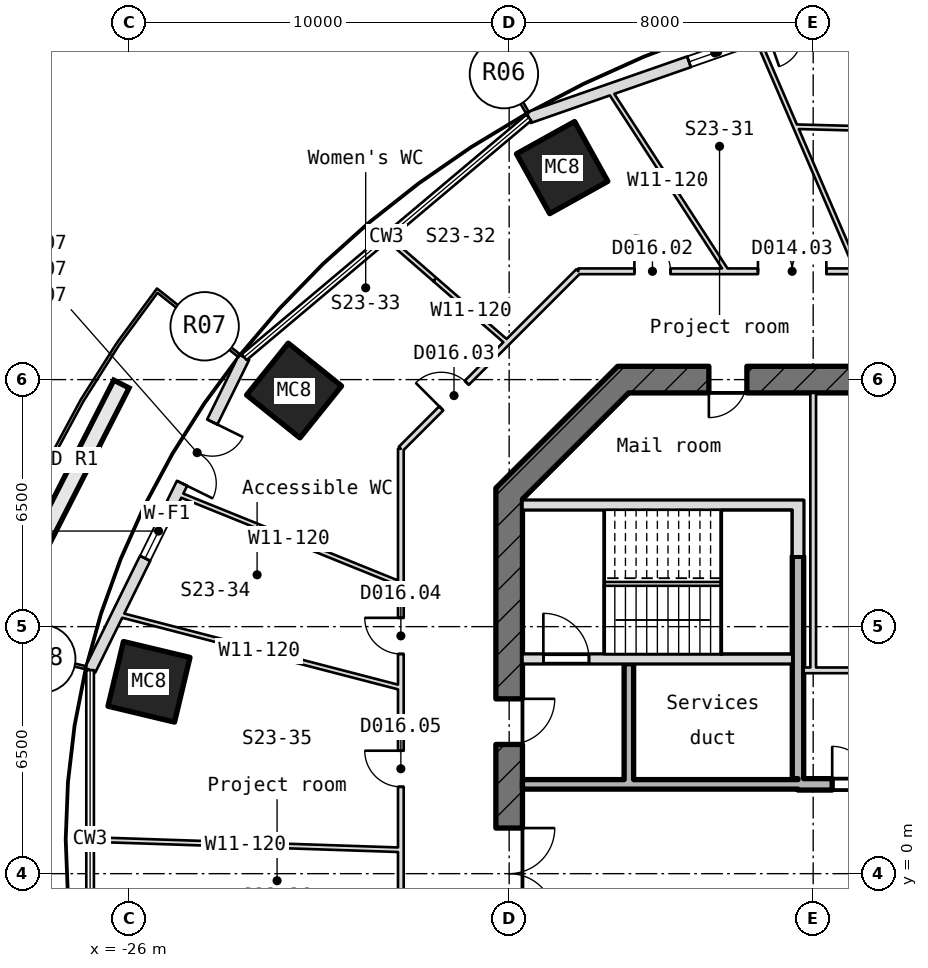
"""IFC4 building model, lengths in metres.
Left out: names, types, materials, properties, quantities, classifications, styles, units other than length and angle.
Written with IfcOpenShell. Run it as: python <this file> out.ifc"""

import sys

from ifc_helpers import new_model, si_unit, direction, frame, frame_2d, origin, origin_2d, place, context, subcontext, project, spatial, rectangle, hollow_rectangle, extrude, element, fill, save


model = new_model("IFC4")
c1 = context("Model", 3, precision=1e-05, world=origin(), true_north=direction((0.0, 1.0)))
c2 = subcontext(c1, "Body", "Model", "MODEL_VIEW")
j1 = project(units=[si_unit("LENGTHUNIT", "METRE"), si_unit("PLANEANGLEUNIT", "RADIAN")], contexts=[c1])
p1 = place(None, origin())
s1 = spatial("IfcSite", under=j1, at=p1, CompositionType="ELEMENT")
p2 = place(p1, origin())
s2 = spatial("IfcBuilding", under=s1, at=p2, CompositionType="ELEMENT")
p3 = place(p2, frame((0.0, 0.0, 334.3)))
s3 = spatial("IfcBuildingStorey", under=s2, at=p3, CompositionType="ELEMENT", Elevation=334.3)
for number, where, z_axis, x_axis in (
    (1, (-14.605, 18.579, -0.18), (0.0, 0.0, 1.0), (0.874, 0.486, 0.0)),
    (2, (-21.66, 12.712, -0.18), (0.0, 0.0, 1.0), (0.626, 0.78, 0.0)),
    (3, (-25.478, 5.048, -0.18), (0.0, 0.0, 1.0), (0.233, 0.973, 0.0)),
):
    element("IfcColumn", number, at=place(p3, frame(where, z_axis=z_axis, x_axis=x_axis)), inside=s3, PredefinedType="COLUMN", context=c2, shape_type="SweptSolid", body=[
        extrude(hollow_rectangle(XDim=1.75, YDim=1.8, WallThickness=0.055, at=origin_2d()), origin(), (0.0, 0.0, 1.0), 4.15),
    ])
p4 = place(p3, frame((-5.697, 23.303, 0.0), z_axis=(0.0, 0.0, 1.0), x_axis=(-0.944298954957, -0.32908886895, 0.0)))
e4 = element("IfcWall", 4, at=p4, inside=s3, PredefinedType="SOLIDWALL", context=c2, shape_type="SweptSolid", body=[
    extrude(rectangle(XDim=10.364, YDim=0.3, at=frame_2d((5.182, 0.0))), origin(), (0.0, 0.0, 1.0), 3.97),
])
p5 = place(p4, frame((1.9, 0.0, 0.0)))
e5 = element("IfcOpeningElement", 5, at=p5, cuts=e4, PredefinedType="OPENING", context=c2, shape_type="SweptSolid", body=[
    extrude(rectangle(XDim=1.8, YDim=2.4, at=frame_2d((0.9, 1.2))), frame((0.0, 0.16, 0.0), z_axis=(0.0, -1.0, 0.0), x_axis=(1.0, 0.0, 0.0)), (0.0, 0.0, 1.0), 0.32),
])
p6 = place(p4, frame((4.3, 0.0, 0.9)))
e6 = element("IfcOpeningElement", 6, at=p6, cuts=e4, PredefinedType="OPENING", context=c2, shape_type="SweptSolid", body=[
    extrude(rectangle(XDim=1.6, YDim=1.5, at=frame_2d((0.8, 0.75))), frame((0.0, 0.16, 0.0), z_axis=(0.0, -1.0, 0.0), x_axis=(1.0, 0.0, 0.0)), (0.0, 0.0, 1.0), 0.32),
])
p7 = place(p3, frame((-22.974, 13.59, 0.0), z_axis=(0.0, 0.0, 1.0), x_axis=(-0.441682707494, -0.89717132472, 0.0)))
e7 = element("IfcWall", 7, at=p7, inside=s3, PredefinedType="SOLIDWALL", context=c2, shape_type="SweptSolid", body=[
    extrude(rectangle(XDim=9.178, YDim=0.3, at=frame_2d((4.589, 0.0))), origin(), (0.0, 0.0, 1.0), 3.97),
])
p8 = place(p7, frame((1.9, 0.0, 0.0)))
e8 = element("IfcOpeningElement", 8, at=p8, cuts=e7, PredefinedType="OPENING", context=c2, shape_type="SweptSolid", body=[
    extrude(rectangle(XDim=1.8, YDim=2.4, at=frame_2d((0.9, 1.2))), frame((0.0, 0.16, 0.0), z_axis=(0.0, -1.0, 0.0), x_axis=(1.0, 0.0, 0.0)), (0.0, 0.0, 1.0), 0.32),
])
p9 = place(p7, frame((4.3, 0.0, 0.9)))
e9 = element("IfcOpeningElement", 9, at=p9, cuts=e7, PredefinedType="OPENING", context=c2, shape_type="SweptSolid", body=[
    extrude(rectangle(XDim=1.6, YDim=1.5, at=frame_2d((0.8, 0.75))), frame((0.0, 0.16, 0.0), z_axis=(0.0, -1.0, 0.0), x_axis=(1.0, 0.0, 0.0)), (0.0, 0.0, 1.0), 0.32),
])
p10 = place(p3, frame((13.145, 13.0, -0.18), z_axis=(0.0, 0.0, 1.0), x_axis=(-1.0, 0.0, 0.0)))
e10 = element("IfcWall", 10, at=p10, inside=s3, PredefinedType="SHEAR", context=c2, shape_type="SweptSolid", body=[
    extrude(rectangle(XDim=26.29, YDim=0.7, at=frame_2d((13.145, 0.0))), origin(), (0.0, 0.0, 1.0), 4.15),
])
p11 = place(p10, frame((22.89, 0.0, 0.18)))
e11 = element("IfcOpeningElement", 11, at=p11, cuts=e10, PredefinedType="OPENING", context=c2, shape_type="SweptSolid", body=[
    extrude(rectangle(XDim=1.0, YDim=2.1, at=frame_2d((0.5, 1.05))), frame((0.0, 0.36, 0.0), z_axis=(0.0, -1.0, 0.0), x_axis=(1.0, 0.0, 0.0)), (0.0, 0.0, 1.0), 0.72),
])
p12 = place(p10, frame((17.645, 0.0, 0.18)))
e12 = element("IfcOpeningElement", 12, at=p12, cuts=e10, PredefinedType="OPENING", context=c2, shape_type="SweptSolid", body=[
    extrude(rectangle(XDim=1.0, YDim=2.1, at=frame_2d((0.5, 1.05))), frame((0.0, 0.36, 0.0), z_axis=(0.0, -1.0, 0.0), x_axis=(1.0, 0.0, 0.0)), (0.0, 0.0, 1.0), 0.72),
])
p13 = place(p10, frame((10.895, 0.0, 0.18)))
e13 = element("IfcOpeningElement", 13, at=p13, cuts=e10, PredefinedType="OPENING", context=c2, shape_type="SweptSolid", body=[
    extrude(rectangle(XDim=1.0, YDim=2.1, at=frame_2d((0.5, 1.05))), frame((0.0, 0.36, 0.0), z_axis=(0.0, -1.0, 0.0), x_axis=(1.0, 0.0, 0.0)), (0.0, 0.0, 1.0), 0.72),
])
p14 = place(p10, frame((3.467, 0.0, 0.18)))
e14 = element("IfcOpeningElement", 14, at=p14, cuts=e10, PredefinedType="OPENING", context=c2, shape_type="SweptSolid", body=[
    extrude(rectangle(XDim=1.0, YDim=2.1, at=frame_2d((0.5, 1.05))), frame((0.0, 0.36, 0.0), z_axis=(0.0, -1.0, 0.0), x_axis=(1.0, 0.0, 0.0)), (0.0, 0.0, 1.0), 0.72),
])
p15 = place(p3, frame((-12.897, 13.103, -0.18), z_axis=(0.0, 0.0, 1.0), x_axis=(-0.707106781187, -0.707106781187, 0.0)))
e15 = element("IfcWall", 15, at=p15, inside=s3, PredefinedType="SHEAR", context=c2, shape_type="SweptSolid", body=[
    extrude(rectangle(XDim=4.533, YDim=0.7, at=frame_2d((2.266, 0.0))), origin(), (0.0, 0.0, 1.0), 4.15),
])
p16 = place(p3, frame((-16.0, 10.145, -0.18), z_axis=(0.0, 0.0, 1.0), x_axis=(0.0, -1.0, 0.0)))
e16 = element("IfcWall", 16, at=p16, inside=s3, PredefinedType="SHEAR", context=c2, shape_type="SweptSolid", body=[
    extrude(rectangle(XDim=20.29, YDim=0.7, at=frame_2d((10.145, 0.0))), origin(), (0.0, 0.0, 1.0), 4.15),
])
p17 = place(p16, frame((8.945, 0.0, 0.18)))
e17 = element("IfcOpeningElement", 17, at=p17, cuts=e16, PredefinedType="OPENING", context=c2, shape_type="SweptSolid", body=[
    extrude(rectangle(XDim=2.4, YDim=2.1, at=frame_2d((1.2, 1.05))), frame((0.0, 0.36, 0.0), z_axis=(0.0, -1.0, 0.0), x_axis=(1.0, 0.0, 0.0)), (0.0, 0.0, 1.0), 0.72),
])
p18 = place(p16, frame((5.545, 0.0, 0.18)))
e18 = element("IfcOpeningElement", 18, at=p18, cuts=e16, PredefinedType="OPENING", context=c2, shape_type="SweptSolid", body=[
    extrude(rectangle(XDim=1.2, YDim=2.1, at=frame_2d((0.6, 1.05))), frame((0.0, 0.36, 0.0), z_axis=(0.0, -1.0, 0.0), x_axis=(1.0, 0.0, 0.0)), (0.0, 0.0, 1.0), 0.72),
])
p19 = place(p3, frame((-15.65, 2.35, 0.0), z_axis=(0.0, 0.0, 1.0), x_axis=(1.0, 0.0, 0.0)))
e19 = element("IfcWall", 19, at=p19, inside=s3, PredefinedType="STANDARD", context=c2, shape_type="SweptSolid", body=[
    extrude(rectangle(XDim=7.25, YDim=0.25, at=frame_2d((3.625, 0.0))), origin(), (0.0, 0.0, 1.0), 3.97),
])
p20 = place(p3, frame((-8.4, 2.35, -0.18), z_axis=(0.0, 0.0, 1.0), x_axis=(1.0, 0.0, 0.0)))
e20 = element("IfcWall", 20, at=p20, inside=s3, PredefinedType="SHEAR", context=c2, shape_type="SweptSolid", body=[
    extrude(rectangle(XDim=16.8, YDim=0.3, at=frame_2d((8.4, 0.0))), origin(), (0.0, 0.0, 1.0), 4.15),
])
p21 = place(p20, frame((0.9, 0.0, 0.18)))
e21 = element("IfcOpeningElement", 21, at=p21, cuts=e20, PredefinedType="OPENING", context=c2, shape_type="SweptSolid", body=[
    extrude(rectangle(XDim=1.0, YDim=2.1, at=frame_2d((0.5, 1.05))), frame((0.0, 0.16, 0.0), z_axis=(0.0, -1.0, 0.0), x_axis=(1.0, 0.0, 0.0)), (0.0, 0.0, 1.0), 0.32),
])
p22 = place(p20, frame((14.9, 0.0, 0.18)))
e22 = element("IfcOpeningElement", 22, at=p22, cuts=e20, PredefinedType="OPENING", context=c2, shape_type="SweptSolid", body=[
    extrude(rectangle(XDim=1.0, YDim=2.1, at=frame_2d((0.5, 1.05))), frame((0.0, 0.16, 0.0), z_axis=(0.0, -1.0, 0.0), x_axis=(1.0, 0.0, 0.0)), (0.0, 0.0, 1.0), 0.32),
])
p23 = place(p3, frame((-8.25, 5.35, 0.0), z_axis=(0.0, 0.0, 1.0), x_axis=(1.0, 0.0, 0.0)))
e23 = element("IfcWall", 23, at=p23, inside=s3, PredefinedType="PARTITIONING", context=c2, shape_type="SweptSolid", body=[
    extrude(rectangle(XDim=11.05, YDim=0.15, at=frame_2d((5.525, 0.0))), origin(), (0.0, 0.0, 1.0), 3.97),
])
p24 = place(p3, frame((-15.65, 5.65, -0.18), z_axis=(0.0, 0.0, 1.0), x_axis=(1.0, 0.0, 0.0)))
e24 = element("IfcWall", 24, at=p24, inside=s3, PredefinedType="SHEAR", context=c2, shape_type="SweptSolid", body=[
    extrude(rectangle(XDim=7.1, YDim=0.25, at=frame_2d((3.55, 0.0))), origin(), (0.0, 0.0, 1.0), 4.15),
])
p25 = place(p24, frame((0.55, 0.0, 0.18)))
e25 = element("IfcOpeningElement", 25, at=p25, cuts=e24, PredefinedType="OPENING", context=c2, shape_type="SweptSolid", body=[
    extrude(rectangle(XDim=1.2, YDim=2.1, at=frame_2d((0.6, 1.05))), frame((0.0, 0.135, 0.0), z_axis=(0.0, -1.0, 0.0), x_axis=(1.0, 0.0, 0.0)), (0.0, 0.0, 1.0), 0.27),
])
p26 = place(p3, frame((-15.65, 9.7, -0.18), z_axis=(0.0, 0.0, 1.0), x_axis=(1.0, 0.0, 0.0)))
e26 = element("IfcWall", 26, at=p26, inside=s3, PredefinedType="SHEAR", context=c2, shape_type="SweptSolid", body=[
    extrude(rectangle(XDim=7.1, YDim=0.25, at=frame_2d((3.55, 0.0))), origin(), (0.0, 0.0, 1.0), 4.15),
])
p27 = place(p3, frame((-12.85, 2.475, 0.0), z_axis=(0.0, 0.0, 1.0), x_axis=(0.0, 1.0, 0.0)))
e27 = element("IfcWall", 27, at=p27, inside=s3, PredefinedType="STANDARD", context=c2, shape_type="SweptSolid", body=[
    extrude(rectangle(XDim=3.05, YDim=0.25, at=frame_2d((1.525, 0.0))), origin(), (0.0, 0.0, 1.0), 3.97),
])
p28 = place(p3, frame((-8.4, 2.5, -0.18), z_axis=(0.0, 0.0, 1.0), x_axis=(0.0, 1.0, 0.0)))
e28 = element("IfcWall", 28, at=p28, inside=s3, PredefinedType="SHEAR", context=c2, shape_type="SweptSolid", body=[
    extrude(rectangle(XDim=5.85, YDim=0.3, at=frame_2d((2.925, 0.0))), origin(), (0.0, 0.0, 1.0), 4.15),
])
p29 = place(p3, frame((-8.4, 8.35, -0.18), z_axis=(0.0, 0.0, 1.0), x_axis=(0.0, 1.0, 0.0)))
e29 = element("IfcWall", 29, at=p29, inside=s3, PredefinedType="SHEAR", context=c2, shape_type="SweptSolid", body=[
    extrude(rectangle(XDim=1.475, YDim=0.3, at=frame_2d((0.737, 0.0))), origin(), (0.0, 0.0, 1.0), 4.15),
])
p30 = place(p3, frame((-8.0, 5.425, 0.0), z_axis=(0.0, 0.0, 1.0), x_axis=(0.0, 1.0, 0.0)))
e30 = element("IfcWall", 30, at=p30, inside=s3, PredefinedType="PARTITIONING", context=c2, shape_type="SweptSolid", body=[
    extrude(rectangle(XDim=7.225, YDim=0.15, at=frame_2d((3.612, 0.0))), origin(), (0.0, 0.0, 1.0), 3.97),
])
p31 = place(p3, frame((-18.85, -11.18, 0.0), z_axis=(0.0, 0.0, 1.0), x_axis=(0.0, 1.0, 0.0)))
e31 = element("IfcWall", 31, at=p31, inside=s3, PredefinedType="PARTITIONING", context=c2, shape_type="SweptSolid", body=[
    extrude(rectangle(XDim=22.361, YDim=0.15, at=frame_2d((11.18, 0.0))), origin(), (0.0, 0.0, 1.0), 3.97),
])
p32 = place(p31, frame((16.962, 0.0, 0.0)))
e32 = element("IfcOpeningElement", 32, at=p32, cuts=e31, PredefinedType="OPENING", context=c2, shape_type="SweptSolid", body=[
    extrude(rectangle(XDim=0.95, YDim=2.1, at=frame_2d((0.475, 1.05))), frame((0.0, 0.085, 0.0), z_axis=(0.0, -1.0, 0.0), x_axis=(1.0, 0.0, 0.0)), (0.0, 0.0, 1.0), 0.17),
])
p33 = place(p31, frame((13.466, 0.0, 0.0)))
e33 = element("IfcOpeningElement", 33, at=p33, cuts=e31, PredefinedType="OPENING", context=c2, shape_type="SweptSolid", body=[
    extrude(rectangle(XDim=0.95, YDim=2.1, at=frame_2d((0.475, 1.05))), frame((0.0, 0.085, 0.0), z_axis=(0.0, -1.0, 0.0), x_axis=(1.0, 0.0, 0.0)), (0.0, 0.0, 1.0), 0.17),
])
p34 = place(p31, frame((7.929, 0.0, 0.0)))
e34 = element("IfcOpeningElement", 34, at=p34, cuts=e31, PredefinedType="OPENING", context=c2, shape_type="SweptSolid", body=[
    extrude(rectangle(XDim=1.8, YDim=2.1, at=frame_2d((0.9, 1.05))), frame((0.0, 0.085, 0.0), z_axis=(0.0, -1.0, 0.0), x_axis=(1.0, 0.0, 0.0)), (0.0, 0.0, 1.0), 0.17),
])
p35 = place(p3, frame((-18.85, 0.628, 0.0), z_axis=(0.0, 0.0, 1.0), x_axis=(-0.999446363227, 0.03327111408, 0.0)))
e35 = element("IfcWall", 35, at=p35, inside=s3, PredefinedType="PARTITIONING", context=c2, shape_type="SweptSolid", body=[
    extrude(rectangle(XDim=8.182, YDim=0.12, at=frame_2d((4.091, 0.0))), origin(), (0.0, 0.0, 1.0), 3.97),
])
p36 = place(p3, frame((-18.85, 4.892, 0.0), z_axis=(0.0, 0.0, 1.0), x_axis=(-0.96792697071, 0.251231724456, 0.0)))
e36 = element("IfcWall", 36, at=p36, inside=s3, PredefinedType="PARTITIONING", context=c2, shape_type="SweptSolid", body=[
    extrude(rectangle(XDim=7.7, YDim=0.12, at=frame_2d((3.85, 0.0))), origin(), (0.0, 0.0, 1.0), 3.97),
])
p37 = place(p3, frame((-18.85, 7.62, 0.0), z_axis=(0.0, 0.0, 1.0), x_axis=(-0.927102963465, 0.374806743716, 0.0)))
e37 = element("IfcWall", 37, at=p37, inside=s3, PredefinedType="PARTITIONING", context=c2, shape_type="SweptSolid", body=[
    extrude(rectangle(XDim=6.354, YDim=0.12, at=frame_2d((3.177, 0.0))), origin(), (0.0, 0.0, 1.0), 3.97),
])
p38 = place(p3, frame((-18.85, 11.18, 0.0), z_axis=(0.0, 0.0, 1.0), x_axis=(0.707106781187, 0.707106781187, 0.0)))
e38 = element("IfcWall", 38, at=p38, inside=s3, PredefinedType="PARTITIONING", context=c2, shape_type="SweptSolid", body=[
    extrude(rectangle(XDim=6.604, YDim=0.15, at=frame_2d((3.302, 0.0))), origin(), (0.0, 0.0, 1.0), 3.97),
])
p39 = place(p38, frame((1.503, 0.0, 0.0)))
e39 = element("IfcOpeningElement", 39, at=p39, cuts=e38, PredefinedType="OPENING", context=c2, shape_type="SweptSolid", body=[
    extrude(rectangle(XDim=0.95, YDim=2.1, at=frame_2d((0.475, 1.05))), frame((0.0, 0.085, 0.0), z_axis=(0.0, -1.0, 0.0), x_axis=(1.0, 0.0, 0.0)), (0.0, 0.0, 1.0), 0.17),
])
p40 = place(p3, frame((-16.053, 13.977, 0.0), z_axis=(0.0, 0.0, 1.0), x_axis=(-0.754199093047, 0.656645816287, 0.0)))
e40 = element("IfcWall", 40, at=p40, inside=s3, PredefinedType="PARTITIONING", context=c2, shape_type="SweptSolid", body=[
    extrude(rectangle(XDim=2.523, YDim=0.12, at=frame_2d((1.261, 0.0))), origin(), (0.0, 0.0, 1.0), 3.668),
])
p41 = place(p3, frame((-17.956, 15.634, 0.0), z_axis=(0.0, 0.0, 1.0), x_axis=(-0.754187929284, 0.656658638352, 0.0)))
e41 = element("IfcWall", 41, at=p41, inside=s3, PredefinedType="PARTITIONING", context=c2, shape_type="SweptSolid", body=[
    extrude(rectangle(XDim=1.687, YDim=0.12, at=frame_2d((0.844, 0.0))), origin(), (0.0, 0.0, 1.0), 3.97),
])
p42 = place(p3, frame((-14.18, 15.85, 0.0), z_axis=(0.0, 0.0, 1.0), x_axis=(1.0, 0.0, 0.0)))
e42 = element("IfcWall", 42, at=p42, inside=s3, PredefinedType="PARTITIONING", context=c2, shape_type="SweptSolid", body=[
    extrude(rectangle(XDim=28.361, YDim=0.15, at=frame_2d((14.18, 0.0))), origin(), (0.0, 0.0, 1.0), 3.97),
])
p43 = place(p42, frame((11.294, 0.0, 0.0)))
e43 = element("IfcOpeningElement", 43, at=p43, cuts=e42, PredefinedType="OPENING", context=c2, shape_type="SweptSolid", body=[
    extrude(rectangle(XDim=0.95, YDim=2.1, at=frame_2d((0.475, 1.05))), frame((0.0, 0.085, 0.0), z_axis=(0.0, -1.0, 0.0), x_axis=(1.0, 0.0, 0.0)), (0.0, 0.0, 1.0), 0.17),
])
p44 = place(p42, frame((18.359, 0.0, 0.0)))
e44 = element("IfcOpeningElement", 44, at=p44, cuts=e42, PredefinedType="OPENING", context=c2, shape_type="SweptSolid", body=[
    extrude(rectangle(XDim=1.8, YDim=2.1, at=frame_2d((0.9, 1.05))), frame((0.0, 0.085, 0.0), z_axis=(0.0, -1.0, 0.0), x_axis=(1.0, 0.0, 0.0)), (0.0, 0.0, 1.0), 0.17),
])
p45 = place(p42, frame((4.727, 0.0, 0.0)))
e45 = element("IfcOpeningElement", 45, at=p45, cuts=e42, PredefinedType="OPENING", context=c2, shape_type="SweptSolid", body=[
    extrude(rectangle(XDim=1.8, YDim=2.1, at=frame_2d((0.9, 1.05))), frame((0.0, 0.085, 0.0), z_axis=(0.0, -1.0, 0.0), x_axis=(1.0, 0.0, 0.0)), (0.0, 0.0, 1.0), 0.17),
])
p46 = place(p42, frame((1.476, 0.0, 0.0)))
e46 = element("IfcOpeningElement", 46, at=p46, cuts=e42, PredefinedType="OPENING", context=c2, shape_type="SweptSolid", body=[
    extrude(rectangle(XDim=0.95, YDim=2.1, at=frame_2d((0.475, 1.05))), frame((0.0, 0.085, 0.0), z_axis=(0.0, -1.0, 0.0), x_axis=(1.0, 0.0, 0.0)), (0.0, 0.0, 1.0), 0.17),
])
p47 = place(p3, frame((-10.278, 15.85, 0.0), z_axis=(0.0, 0.0, 1.0), x_axis=(-0.544086684893, 0.839029009822, 0.0)))
e47 = element("IfcWall", 47, at=p47, inside=s3, PredefinedType="PARTITIONING", context=c2, shape_type="SweptSolid", body=[
    extrude(rectangle(XDim=5.693, YDim=0.12, at=frame_2d((2.847, 0.0))), origin(), (0.0, 0.0, 1.0), 3.97),
])
p48 = place(p3, frame((-6.83, 15.85, 0.0), z_axis=(0.0, 0.0, 1.0), x_axis=(-0.39569122033, 0.918383611654, 0.0)))
e48 = element("IfcWall", 48, at=p48, inside=s3, PredefinedType="PARTITIONING", context=c2, shape_type="SweptSolid", body=[
    extrude(rectangle(XDim=6.682, YDim=0.12, at=frame_2d((3.341, 0.0))), origin(), (0.0, 0.0, 1.0), 3.97),
])
p49 = place(p3, frame((2.453, 19.367, 0.0), z_axis=(0.0, 0.0, 1.0), x_axis=(-0.999654058519, 0.026301393246, 0.0)))
e49 = element("IfcWall", 49, at=p49, inside=s3, PredefinedType="PARTITIONING", context=c2, shape_type="SweptSolid", body=[
    extrude(rectangle(XDim=10.925, YDim=0.12, at=frame_2d((5.463, 0.0))), origin(), (0.0, 0.0, 1.0), 3.97),
])
p50 = place(p6, origin())
e50 = element("IfcWindow", 50, at=p50, inside=s3, PartitioningType="SINGLE_PANEL", PredefinedType="WINDOW", context=c2, shape_type="SweptSolid", body=[
    extrude(rectangle(XDim=1.6, YDim=1.5, at=frame_2d((0.8, 0.75))), frame((0.0, 0.03, 0.0), z_axis=(0.0, -1.0, 0.0), x_axis=(1.0, 0.0, 0.0)), (0.0, 0.0, 1.0), 0.06),
])
fill(e6, e50)
p51 = place(p8, origin())
e51 = element("IfcDoor", 51, at=p51, inside=s3, OperationType="SINGLE_SWING_LEFT", PredefinedType="DOOR", context=c2, shape_type="SweptSolid", body=[
    extrude(rectangle(XDim=1.8, YDim=2.4, at=frame_2d((0.9, 1.2))), frame((0.0, 0.025, 0.0), z_axis=(0.0, -1.0, 0.0), x_axis=(1.0, 0.0, 0.0)), (0.0, 0.0, 1.0), 0.05),
])
fill(e8, e51)
p52 = place(p9, origin())
e52 = element("IfcWindow", 52, at=p52, inside=s3, PartitioningType="SINGLE_PANEL", PredefinedType="WINDOW", context=c2, shape_type="SweptSolid", body=[
    extrude(rectangle(XDim=1.6, YDim=1.5, at=frame_2d((0.8, 0.75))), frame((0.0, 0.03, 0.0), z_axis=(0.0, -1.0, 0.0), x_axis=(1.0, 0.0, 0.0)), (0.0, 0.0, 1.0), 0.06),
])
fill(e9, e52)
p53 = place(p25, origin())
e53 = element("IfcDoor", 53, at=p53, inside=s3, OperationType="SINGLE_SWING_RIGHT", PredefinedType="DOOR", context=c2, shape_type="SweptSolid", body=[
    extrude(rectangle(XDim=1.2, YDim=2.1, at=frame_2d((0.6, 1.05))), frame((0.0, 0.025, 0.0), z_axis=(0.0, -1.0, 0.0), x_axis=(1.0, 0.0, 0.0)), (0.0, 0.0, 1.0), 0.05),
])
fill(e25, e53)
p54 = place(p17, origin())
e54 = element("IfcDoor", 54, at=p54, inside=s3, OperationType="DOUBLE_DOOR_SINGLE_SWING", PredefinedType="DOOR", context=c2, shape_type="SweptSolid", body=[
    extrude(rectangle(XDim=2.4, YDim=2.1, at=frame_2d((1.2, 1.05))), frame((0.0, 0.025, 0.0), z_axis=(0.0, -1.0, 0.0), x_axis=(1.0, 0.0, 0.0)), (0.0, 0.0, 1.0), 0.05),
])
fill(e17, e54)
p55 = place(p18, origin())
e55 = element("IfcDoor", 55, at=p55, inside=s3, OperationType="SINGLE_SWING_RIGHT", PredefinedType="DOOR", context=c2, shape_type="SweptSolid", body=[
    extrude(rectangle(XDim=1.2, YDim=2.1, at=frame_2d((0.6, 1.05))), frame((0.0, 0.025, 0.0), z_axis=(0.0, -1.0, 0.0), x_axis=(1.0, 0.0, 0.0)), (0.0, 0.0, 1.0), 0.05),
])
fill(e18, e55)
p56 = place(p21, origin())
e56 = element("IfcDoor", 56, at=p56, inside=s3, OperationType="SINGLE_SWING_RIGHT", PredefinedType="DOOR", context=c2, shape_type="SweptSolid", body=[
    extrude(rectangle(XDim=1.0, YDim=2.1, at=frame_2d((0.5, 1.05))), frame((0.0, 0.025, 0.0), z_axis=(0.0, -1.0, 0.0), x_axis=(1.0, 0.0, 0.0)), (0.0, 0.0, 1.0), 0.05),
])
fill(e21, e56)
p57 = place(p11, origin())
e57 = element("IfcDoor", 57, at=p57, inside=s3, OperationType="SINGLE_SWING_RIGHT", PredefinedType="DOOR", context=c2, shape_type="SweptSolid", body=[
    extrude(rectangle(XDim=1.0, YDim=2.1, at=frame_2d((0.5, 1.05))), frame((0.0, 0.025, 0.0), z_axis=(0.0, -1.0, 0.0), x_axis=(1.0, 0.0, 0.0)), (0.0, 0.0, 1.0), 0.05),
])
fill(e11, e57)
p58 = place(p45, origin())
e58 = element("IfcDoor", 58, at=p58, inside=s3, OperationType="DOUBLE_DOOR_SINGLE_SWING", PredefinedType="DOOR", context=c2, shape_type="SweptSolid", body=[
    extrude(rectangle(XDim=1.8, YDim=2.1, at=frame_2d((0.9, 1.05))), frame((0.0, 0.025, 0.0), z_axis=(0.0, -1.0, 0.0), x_axis=(1.0, 0.0, 0.0)), (0.0, 0.0, 1.0), 0.05),
])
fill(e45, e58)
p59 = place(p46, origin())
e59 = element("IfcDoor", 59, at=p59, inside=s3, OperationType="SINGLE_SWING_RIGHT", PredefinedType="DOOR", context=c2, shape_type="SweptSolid", body=[
    extrude(rectangle(XDim=0.95, YDim=2.1, at=frame_2d((0.475, 1.05))), frame((0.0, 0.025, 0.0), z_axis=(0.0, -1.0, 0.0), x_axis=(1.0, 0.0, 0.0)), (0.0, 0.0, 1.0), 0.05),
])
fill(e46, e59)
p60 = place(p39, origin())
e60 = element("IfcDoor", 60, at=p60, inside=s3, OperationType="SINGLE_SWING_RIGHT", PredefinedType="DOOR", context=c2, shape_type="SweptSolid", body=[
    extrude(rectangle(XDim=0.95, YDim=2.1, at=frame_2d((0.475, 1.05))), frame((0.0, 0.025, 0.0), z_axis=(0.0, -1.0, 0.0), x_axis=(1.0, 0.0, 0.0)), (0.0, 0.0, 1.0), 0.05),
])
fill(e39, e60)
p61 = place(p32, origin())
e61 = element("IfcDoor", 61, at=p61, inside=s3, OperationType="SINGLE_SWING_RIGHT", PredefinedType="DOOR", context=c2, shape_type="SweptSolid", body=[
    extrude(rectangle(XDim=0.95, YDim=2.1, at=frame_2d((0.475, 1.05))), frame((0.0, 0.025, 0.0), z_axis=(0.0, -1.0, 0.0), x_axis=(1.0, 0.0, 0.0)), (0.0, 0.0, 1.0), 0.05),
])
fill(e32, e61)
p62 = place(p33, origin())
e62 = element("IfcDoor", 62, at=p62, inside=s3, OperationType="SINGLE_SWING_RIGHT", PredefinedType="DOOR", context=c2, shape_type="SweptSolid", body=[
    extrude(rectangle(XDim=0.95, YDim=2.1, at=frame_2d((0.475, 1.05))), frame((0.0, 0.025, 0.0), z_axis=(0.0, -1.0, 0.0), x_axis=(1.0, 0.0, 0.0)), (0.0, 0.0, 1.0), 0.05),
])
fill(e33, e62)
save(model, sys.argv[1])
